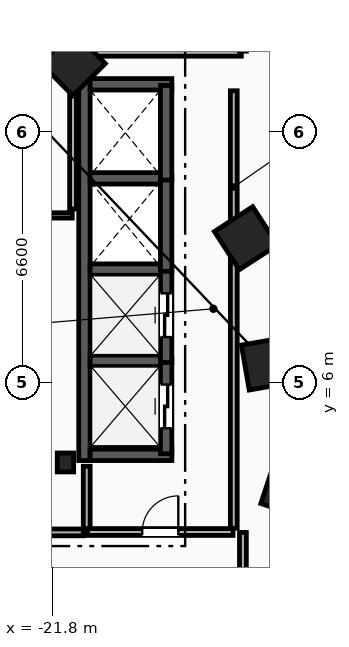
"""IFC4 building model, lengths in metres.
Left out: names, types, materials, properties, quantities, classifications, styles, units other than length and angle.
Written with IfcOpenShell. Run it as: python <this file> out.ifc"""

import sys

from ifc_helpers import new_model, si_unit, direction, frame, frame_2d, origin, origin_2d, place, context, subcontext, project, spatial, rectangle, i_section, extrude, element, fill, save


model = new_model("IFC4")
c1 = context("Model", 3, precision=1e-05, world=origin(), true_north=direction((0.0, 1.0)))
c2 = subcontext(c1, "Body", "Model", "MODEL_VIEW")
j1 = project(units=[si_unit("LENGTHUNIT", "METRE"), si_unit("PLANEANGLEUNIT", "RADIAN")], contexts=[c1])
p1 = place(None, origin())
s1 = spatial("IfcSite", under=j1, at=p1, CompositionType="ELEMENT")
p2 = place(p1, origin())
s2 = spatial("IfcBuilding", under=s1, at=p2, CompositionType="ELEMENT")
p3 = place(p2, frame((0.0, 0.0, 58.2)))
s3 = spatial("IfcBuildingStorey", under=s2, at=p3, CompositionType="ELEMENT", Elevation=58.2)
p4 = place(p3, frame((-21.45, 3.9, 0.0), z_axis=(0.0, 0.0, 1.0), x_axis=(1.0, 0.0, 0.0)))
e1 = element("IfcColumn", 1, at=p4, inside=s3, PredefinedType="COLUMN", context=c2, shape_type="SweptSolid", body=[
    extrude(i_section(OverallWidth=0.432, OverallDepth=0.498, WebThickness=0.056, FlangeThickness=0.089, FilletRadius=0.018, at=origin_2d()), origin(), (0.0, 0.0, 1.0), 3.8),
])
for number, where, z_axis, x_axis in (
    (2, (-15.55, 3.2, 0.0), (0.0, 0.0, 1.0), (0.315, 0.949, 0.0)),
    (3, (-16.125, 6.5, 0.0), (0.0, 0.0, 1.0), (-0.172, 0.985, 0.0)),
    (4, (-16.7, 9.8, 0.0), (0.0, 0.0, 1.0), (-0.544, 0.839, 0.0)),
    (5, (-21.25, 14.4, 0.0), (0.0, 0.0, 1.0), (-0.703, 0.711, 0.0)),
):
    element("IfcColumn", number, at=place(p3, frame(where, z_axis=z_axis, x_axis=x_axis)), inside=s3, PredefinedType="COLUMN", context=c2, shape_type="SweptSolid", body=[
        extrude(rectangle(XDim=1.2, YDim=1.2, at=origin_2d()), origin(), (0.0, 0.0, 1.0), 3.8),
    ])
p5 = place(p3, frame((-20.89, 2.15, 0.0), z_axis=(0.0, 0.0, 1.0), x_axis=(0.0, 1.0, 0.0)))
e6 = element("IfcWall", 6, at=p5, inside=s3, PredefinedType="PARTITIONING", context=c2, shape_type="SweptSolid", body=[
    extrude(rectangle(XDim=1.65, YDim=0.18, at=frame_2d((0.825, 0.0))), origin(), (0.0, 0.0, 1.0), 3.5),
])
p6 = place(p3, frame((-23.98, 2.06, 0.0), z_axis=(0.0, 0.0, 1.0), x_axis=(1.0, 0.0, 0.0)))
e7 = element("IfcWall", 7, at=p6, inside=s3, PredefinedType="PARTITIONING", context=c2, shape_type="SweptSolid", body=[
    extrude(rectangle(XDim=3.0, YDim=0.18, at=frame_2d((1.5, 0.0))), origin(), (0.0, 0.0, 1.0), 3.5),
])
p7 = place(p6, frame((0.9, 0.0, 0.0)))
e8 = element("IfcOpeningElement", 8, at=p7, cuts=e7, PredefinedType="OPENING", context=c2, shape_type="SweptSolid", body=[
    extrude(rectangle(XDim=1.2, YDim=2.15, at=frame_2d((0.6, 1.075))), frame((0.0, 0.1, 0.0), z_axis=(0.0, -1.0, 0.0), x_axis=(1.0, 0.0, 0.0)), (0.0, 0.0, 1.0), 0.2),
])
p8 = place(p3, frame((-20.95, 3.95, 0.0), z_axis=(0.0, 0.0, 1.0), x_axis=(0.0, 1.0, 0.0)))
e9 = element("IfcWall", 9, at=p8, inside=s3, PredefinedType="SHEAR", context=c2, shape_type="SweptSolid", body=[
    extrude(rectangle(XDim=10.05, YDim=0.3, at=frame_2d((5.025, 0.0))), origin(), (0.0, 0.0, 1.0), 3.5),
])
for number, where, z_axis, x_axis in (
    (10, (-20.8, 4.1, 0.0), (0.0, 0.0, 1.0), (1.0, 0.0, 0.0)),
    (11, (-20.8, 13.85, 0.0), (0.0, 0.0, 1.0), (1.0, 0.0, 0.0)),
):
    element("IfcWall", number, at=place(p3, frame(where, z_axis=z_axis, x_axis=x_axis)), inside=s3, PredefinedType="SHEAR", context=c2, shape_type="SweptSolid", body=[
        extrude(rectangle(XDim=2.15, YDim=0.3, at=frame_2d((1.075, 0.0))), origin(), (0.0, 0.0, 1.0), 3.5),
    ])
for number, where, z_axis, x_axis in (
    (12, (-20.8, 6.575, 0.0), (0.0, 0.0, 1.0), (1.0, 0.0, 0.0)),
    (13, (-20.8, 8.975, 0.0), (0.0, 0.0, 1.0), (1.0, 0.0, 0.0)),
    (14, (-20.8, 11.375, 0.0), (0.0, 0.0, 1.0), (1.0, 0.0, 0.0)),
):
    element("IfcWall", number, at=place(p3, frame(where, z_axis=z_axis, x_axis=x_axis)), inside=s3, PredefinedType="SHEAR", context=c2, shape_type="SweptSolid", body=[
        extrude(rectangle(XDim=1.85, YDim=0.3, at=frame_2d((0.925, 0.0))), origin(), (0.0, 0.0, 1.0), 3.5),
    ])
p9 = place(p3, frame((-18.8, 4.13, 0.0), z_axis=(0.0, 0.0, 1.0), x_axis=(0.0, 1.0, 0.0)))
e15 = element("IfcWall", 15, at=p9, inside=s3, PredefinedType="SHEAR", context=c2, shape_type="SweptSolid", body=[
    extrude(rectangle(XDim=2.49, YDim=0.3, at=frame_2d((1.245, 0.0))), origin(), (0.0, 0.0, 1.0), 3.5),
])
p10 = place(p9, frame((0.67, 0.0, 0.0)))
e16 = element("IfcOpeningElement", 16, at=p10, cuts=e15, PredefinedType="OPENING", context=c2, shape_type="SweptSolid", body=[
    extrude(rectangle(XDim=1.15, YDim=2.2, at=frame_2d((0.575, 1.1))), frame((0.0, 0.16, 0.0), z_axis=(0.0, -1.0, 0.0), x_axis=(1.0, 0.0, 0.0)), (0.0, 0.0, 1.0), 0.32),
])
p11 = place(p3, frame((-18.8, 6.53, 0.0), z_axis=(0.0, 0.0, 1.0), x_axis=(0.0, 1.0, 0.0)))
e17 = element("IfcWall", 17, at=p11, inside=s3, PredefinedType="SHEAR", context=c2, shape_type="SweptSolid", body=[
    extrude(rectangle(XDim=2.49, YDim=0.3, at=frame_2d((1.245, 0.0))), origin(), (0.0, 0.0, 1.0), 3.5),
])
p12 = place(p11, frame((0.67, 0.0, 0.0)))
e18 = element("IfcOpeningElement", 18, at=p12, cuts=e17, PredefinedType="OPENING", context=c2, shape_type="SweptSolid", body=[
    extrude(rectangle(XDim=1.15, YDim=2.2, at=frame_2d((0.575, 1.1))), frame((0.0, 0.16, 0.0), z_axis=(0.0, -1.0, 0.0), x_axis=(1.0, 0.0, 0.0)), (0.0, 0.0, 1.0), 0.32),
])
for number, where, z_axis, x_axis in (
    (19, (-18.8, 8.93, 0.0), (0.0, 0.0, 1.0), (0.0, 1.0, 0.0)),
    (20, (-18.8, 11.33, 0.0), (0.0, 0.0, 1.0), (0.0, 1.0, 0.0)),
):
    element("IfcWall", number, at=place(p3, frame(where, z_axis=z_axis, x_axis=x_axis)), inside=s3, PredefinedType="SHEAR", context=c2, shape_type="SweptSolid", body=[
        extrude(rectangle(XDim=2.49, YDim=0.3, at=frame_2d((1.245, 0.0))), origin(), (0.0, 0.0, 1.0), 3.5),
    ])
p13 = place(p3, frame((-17.02, 2.17, 0.0), z_axis=(0.0, 0.0, 1.0), x_axis=(0.0, 1.0, 0.0)))
e21 = element("IfcWall", 21, at=p13, inside=s3, PredefinedType="PARTITIONING", context=c2, shape_type="SweptSolid", body=[
    extrude(rectangle(XDim=11.51, YDim=0.18, at=frame_2d((5.755, 0.0))), origin(), (0.0, 0.0, 1.0), 3.5),
])
p14 = place(p3, frame((-20.87, 2.07, 0.0), z_axis=(0.0, 0.0, 1.0), x_axis=(1.0, 0.0, 0.0)))
e22 = element("IfcWall", 22, at=p14, inside=s3, PredefinedType="PARTITIONING", context=c2, shape_type="SweptSolid", body=[
    extrude(rectangle(XDim=3.83, YDim=0.18, at=frame_2d((1.915, 0.0))), origin(), (0.0, 0.0, 1.0), 3.5),
])
p15 = place(p14, frame((1.44, 0.0, 0.0)))
e23 = element("IfcOpeningElement", 23, at=p15, cuts=e22, PredefinedType="OPENING", context=c2, shape_type="SweptSolid", body=[
    extrude(rectangle(XDim=0.95, YDim=2.1, at=frame_2d((0.475, 1.05))), frame((0.0, 0.1, 0.0), z_axis=(0.0, -1.0, 0.0), x_axis=(1.0, 0.0, 0.0)), (0.0, 0.0, 1.0), 0.2),
])
p16 = place(p3, frame((-21.86, 10.4, 0.0), z_axis=(0.0, 0.0, 1.0), x_axis=(1.0, 0.0, 0.0)))
e24 = element("IfcWall", 24, at=p16, inside=s3, PredefinedType="PARTITIONING", context=c2, shape_type="SweptSolid", body=[
    extrude(rectangle(XDim=0.59, YDim=0.14, at=frame_2d((0.295, 0.0))), origin(), (0.0, 0.0, 1.0), 3.5),
])
p17 = place(p3, frame((-21.25, 10.57, 0.0), z_axis=(0.0, 0.0, 1.0), x_axis=(0.0, 1.0, 0.0)))
e25 = element("IfcWall", 25, at=p17, inside=s3, PredefinedType="PARTITIONING", context=c2, shape_type="SweptSolid", body=[
    extrude(rectangle(XDim=4.36, YDim=0.18, at=frame_2d((2.18, 0.0))), origin(), (0.0, 0.0, 1.0), 3.5),
])
p18 = place(p3, frame((-21.178, 14.68, 0.0), z_axis=(0.0, 0.0, 1.0), x_axis=(1.0, 0.0, 0.0)))
e26 = element("IfcWall", 26, at=p18, inside=s3, PredefinedType="PARTITIONING", context=c2, shape_type="SweptSolid", body=[
    extrude(rectangle(XDim=4.357, YDim=0.18, at=frame_2d((2.178, 0.0))), origin(), (0.0, 0.0, 1.0), 3.5),
])
p19 = place(p3, frame((-16.78, -0.329, 0.0), z_axis=(0.0, 0.0, 1.0), x_axis=(0.0, 1.0, 0.0)))
e27 = element("IfcWall", 27, at=p19, inside=s3, PredefinedType="PARTITIONING", context=c2, shape_type="SweptSolid", body=[
    extrude(rectangle(XDim=2.387, YDim=0.18, at=frame_2d((1.194, 0.0))), origin(), (0.0, 0.0, 1.0), 3.5),
])
p20 = place(p10, origin())
e28 = element("IfcDoor", 28, at=p20, inside=s3, OperationType="SLIDING_TO_LEFT", PredefinedType="TRAPDOOR", context=c2, shape_type="SweptSolid", body=[
    extrude(rectangle(XDim=1.15, YDim=2.2, at=frame_2d((0.575, 1.1))), frame((0.0, 0.025, 0.0), z_axis=(0.0, -1.0, 0.0), x_axis=(1.0, 0.0, 0.0)), (0.0, 0.0, 1.0), 0.05),
])
fill(e16, e28)
p21 = place(p12, origin())
e29 = element("IfcDoor", 29, at=p21, inside=s3, OperationType="SLIDING_TO_LEFT", PredefinedType="TRAPDOOR", context=c2, shape_type="SweptSolid", body=[
    extrude(rectangle(XDim=1.15, YDim=2.2, at=frame_2d((0.575, 1.1))), frame((0.0, 0.025, 0.0), z_axis=(0.0, -1.0, 0.0), x_axis=(1.0, 0.0, 0.0)), (0.0, 0.0, 1.0), 0.05),
])
fill(e18, e29)
p22 = place(p15, origin())
e30 = element("IfcDoor", 30, at=p22, inside=s3, OperationType="SINGLE_SWING_RIGHT", PredefinedType="DOOR", context=c2, shape_type="SweptSolid", body=[
    extrude(rectangle(XDim=0.95, YDim=2.1, at=frame_2d((0.475, 1.05))), frame((0.0, 0.025, 0.0), z_axis=(0.0, -1.0, 0.0), x_axis=(1.0, 0.0, 0.0)), (0.0, 0.0, 1.0), 0.05),
])
fill(e23, e30)
save(model, sys.argv[1])
